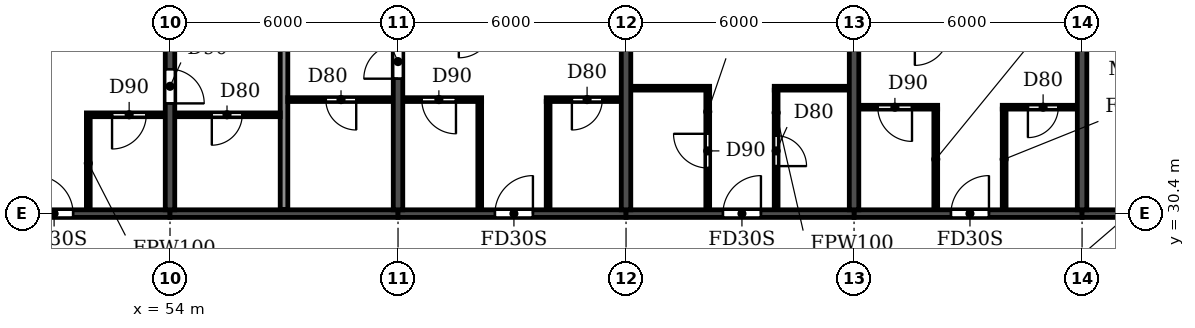
"""IFC4 building model, lengths in metres.
Left out: names, types, materials, properties, quantities, classifications, styles, units other than length and angle.
Written with IfcOpenShell. Run it as: python <this file> out.ifc"""

import sys

from ifc_helpers import new_model, si_unit, direction, frame, frame_2d, origin, place, context, subcontext, project, spatial, rectangle, extrude, element, fill, save


model = new_model("IFC4")
c1 = context("Model", 3, precision=1e-05, world=origin(), true_north=direction((0.0, 1.0)))
c2 = subcontext(c1, "Body", "Model", "MODEL_VIEW")
j1 = project(units=[si_unit("LENGTHUNIT", "METRE"), si_unit("PLANEANGLEUNIT", "RADIAN")], contexts=[c1])
p1 = place(None, origin())
s1 = spatial("IfcSite", under=j1, at=p1, CompositionType="ELEMENT")
p2 = place(p1, origin())
s2 = spatial("IfcBuilding", under=s1, at=p2, CompositionType="ELEMENT")
p3 = place(p2, frame((0.0, 0.0, 231.3)))
s3 = spatial("IfcBuildingStorey", under=s2, at=p3, CompositionType="ELEMENT", Elevation=231.3)
p4 = place(p3, frame((54.0, 30.5, 0.0), z_axis=(0.0, 0.0, 1.0), x_axis=(0.0, 1.0, 0.0)))
e1 = element("IfcWall", 1, at=p4, inside=s3, PredefinedType="SHEAR", context=c2, shape_type="SweptSolid", body=[
    extrude(rectangle(XDim=10.5, YDim=0.25, at=frame_2d((5.25, 0.0))), origin(), (0.0, 0.0, 1.0), 3.08),
])
p5 = place(p4, frame((2.8, 0.0, 0.0)))
e2 = element("IfcOpeningElement", 2, at=p5, cuts=e1, PredefinedType="OPENING", context=c2, shape_type="SweptSolid", body=[
    extrude(rectangle(XDim=0.9, YDim=2.1, at=frame_2d((0.45, 1.05))), frame((0.0, 0.135, 0.0), z_axis=(0.0, -1.0, 0.0), x_axis=(1.0, 0.0, 0.0)), (0.0, 0.0, 1.0), 0.27),
])
p6 = place(p3, frame((60.0, 30.5, 0.0), z_axis=(0.0, 0.0, 1.0), x_axis=(0.0, 1.0, 0.0)))
e3 = element("IfcWall", 3, at=p6, inside=s3, PredefinedType="SHEAR", context=c2, shape_type="SweptSolid", body=[
    extrude(rectangle(XDim=10.5, YDim=0.25, at=frame_2d((5.25, 0.0))), origin(), (0.0, 0.0, 1.0), 3.08),
])
p7 = place(p6, frame((3.45, 0.0, 0.0)))
e4 = element("IfcOpeningElement", 4, at=p7, cuts=e3, PredefinedType="OPENING", context=c2, shape_type="SweptSolid", body=[
    extrude(rectangle(XDim=0.9, YDim=2.1, at=frame_2d((0.45, 1.05))), frame((0.0, 0.135, 0.0), z_axis=(0.0, -1.0, 0.0), x_axis=(1.0, 0.0, 0.0)), (0.0, 0.0, 1.0), 0.27),
])
for number, where, z_axis, x_axis in (
    (5, (66.0, 30.5, 0.0), (0.0, 0.0, 1.0), (0.0, 1.0, 0.0)),
    (6, (72.0, 30.5, 0.0), (0.0, 0.0, 1.0), (0.0, 1.0, 0.0)),
    (7, (78.0, 30.5, 0.0), (0.0, 0.0, 1.0), (0.0, 1.0, 0.0)),
):
    element("IfcWall", number, at=place(p3, frame(where, z_axis=z_axis, x_axis=x_axis)), inside=s3, PredefinedType="SHEAR", context=c2, shape_type="SweptSolid", body=[
        extrude(rectangle(XDim=10.5, YDim=0.25, at=frame_2d((5.25, 0.0))), origin(), (0.0, 0.0, 1.0), 3.08),
    ])
p8 = place(p3, frame((48.0, 30.4, 0.0), z_axis=(0.0, 0.0, 1.0), x_axis=(1.0, 0.0, 0.0)))
e8 = element("IfcWall", 8, at=p8, inside=s3, PredefinedType="SHEAR", context=c2, shape_type="SweptSolid", body=[
    extrude(rectangle(XDim=6.0, YDim=0.2, at=frame_2d((3.0, 0.0))), origin(), (0.0, 0.0, 1.0), 2.48),
])
p9 = place(p8, frame((2.45, 0.0, 0.0)))
e9 = element("IfcOpeningElement", 9, at=p9, cuts=e8, PredefinedType="OPENING", context=c2, shape_type="SweptSolid", body=[
    extrude(rectangle(XDim=1.0, YDim=2.1, at=frame_2d((0.5, 1.05))), frame((0.0, 0.11, 0.0), z_axis=(0.0, -1.0, 0.0), x_axis=(1.0, 0.0, 0.0)), (0.0, 0.0, 1.0), 0.22),
])
p10 = place(p3, frame((54.0, 30.4, 0.0), z_axis=(0.0, 0.0, 1.0), x_axis=(1.0, 0.0, 0.0)))
e10 = element("IfcWall", 10, at=p10, inside=s3, PredefinedType="SHEAR", context=c2, shape_type="SweptSolid", body=[
    extrude(rectangle(XDim=6.0, YDim=0.2, at=frame_2d((3.0, 0.0))), origin(), (0.0, 0.0, 1.0), 2.48),
])
p11 = place(p3, frame((60.0, 30.4, 0.0), z_axis=(0.0, 0.0, 1.0), x_axis=(1.0, 0.0, 0.0)))
e11 = element("IfcWall", 11, at=p11, inside=s3, PredefinedType="SHEAR", context=c2, shape_type="SweptSolid", body=[
    extrude(rectangle(XDim=6.0, YDim=0.2, at=frame_2d((3.0, 0.0))), origin(), (0.0, 0.0, 1.0), 2.48),
])
p12 = place(p11, frame((2.55, 0.0, 0.0)))
e12 = element("IfcOpeningElement", 12, at=p12, cuts=e11, PredefinedType="OPENING", context=c2, shape_type="SweptSolid", body=[
    extrude(rectangle(XDim=1.0, YDim=2.1, at=frame_2d((0.5, 1.05))), frame((0.0, 0.11, 0.0), z_axis=(0.0, -1.0, 0.0), x_axis=(1.0, 0.0, 0.0)), (0.0, 0.0, 1.0), 0.22),
])
p13 = place(p3, frame((66.0, 30.4, 0.0), z_axis=(0.0, 0.0, 1.0), x_axis=(1.0, 0.0, 0.0)))
e13 = element("IfcWall", 13, at=p13, inside=s3, PredefinedType="SHEAR", context=c2, shape_type="SweptSolid", body=[
    extrude(rectangle(XDim=6.0, YDim=0.2, at=frame_2d((3.0, 0.0))), origin(), (0.0, 0.0, 1.0), 2.48),
])
p14 = place(p13, frame((2.55, 0.0, 0.0)))
e14 = element("IfcOpeningElement", 14, at=p14, cuts=e13, PredefinedType="OPENING", context=c2, shape_type="SweptSolid", body=[
    extrude(rectangle(XDim=1.0, YDim=2.1, at=frame_2d((0.5, 1.05))), frame((0.0, 0.11, 0.0), z_axis=(0.0, -1.0, 0.0), x_axis=(1.0, 0.0, 0.0)), (0.0, 0.0, 1.0), 0.22),
])
p15 = place(p3, frame((72.0, 30.4, 0.0), z_axis=(0.0, 0.0, 1.0), x_axis=(1.0, 0.0, 0.0)))
e15 = element("IfcWall", 15, at=p15, inside=s3, PredefinedType="SHEAR", context=c2, shape_type="SweptSolid", body=[
    extrude(rectangle(XDim=6.0, YDim=0.2, at=frame_2d((3.0, 0.0))), origin(), (0.0, 0.0, 1.0), 2.48),
])
p16 = place(p15, frame((2.55, 0.0, 0.0)))
e16 = element("IfcOpeningElement", 16, at=p16, cuts=e15, PredefinedType="OPENING", context=c2, shape_type="SweptSolid", body=[
    extrude(rectangle(XDim=1.0, YDim=2.1, at=frame_2d((0.5, 1.05))), frame((0.0, 0.11, 0.0), z_axis=(0.0, -1.0, 0.0), x_axis=(1.0, 0.0, 0.0)), (0.0, 0.0, 1.0), 0.22),
])
p17 = place(p3, frame((78.0, 30.4, 0.0), z_axis=(0.0, 0.0, 1.0), x_axis=(1.0, 0.0, 0.0)))
e17 = element("IfcWall", 17, at=p17, inside=s3, PredefinedType="SHEAR", context=c2, shape_type="SweptSolid", body=[
    extrude(rectangle(XDim=5.8, YDim=0.2, at=frame_2d((2.9, 0.0))), origin(), (0.0, 0.0, 1.0), 2.48),
])
p18 = place(p17, frame((2.5, 0.0, 0.0)))
e18 = element("IfcOpeningElement", 18, at=p18, cuts=e17, PredefinedType="OPENING", context=c2, shape_type="SweptSolid", body=[
    extrude(rectangle(XDim=1.0, YDim=2.1, at=frame_2d((0.5, 1.05))), frame((0.0, 0.11, 0.0), z_axis=(0.0, -1.0, 0.0), x_axis=(1.0, 0.0, 0.0)), (0.0, 0.0, 1.0), 0.22),
])
p19 = place(p3, frame((57.0, 30.51, 0.0), z_axis=(0.0, 0.0, 1.0), x_axis=(0.0, 1.0, 0.0)))
e19 = element("IfcWall", 19, at=p19, inside=s3, PredefinedType="PARTITIONING", context=c2, shape_type="SweptSolid", body=[
    extrude(rectangle(XDim=10.63, YDim=0.2, at=frame_2d((5.315, 0.0))), origin(), (0.0, 0.0, 1.0), 3.08),
])
p20 = place(p3, frame((51.8, 33.0, 0.0), z_axis=(0.0, 0.0, 1.0), x_axis=(1.0, 0.0, 0.0)))
e20 = element("IfcWall", 20, at=p20, inside=s3, PredefinedType="PARTITIONING", context=c2, shape_type="SweptSolid", body=[
    extrude(rectangle(XDim=2.065, YDim=0.1, at=frame_2d((1.032, 0.0))), origin(), (0.0, 0.0, 1.0), 3.08),
])
p21 = place(p20, frame((0.675, 0.0, 0.0)))
e21 = element("IfcOpeningElement", 21, at=p21, cuts=e20, PredefinedType="OPENING", context=c2, shape_type="SweptSolid", body=[
    extrude(rectangle(XDim=0.9, YDim=2.1, at=frame_2d((0.45, 1.05))), frame((0.0, 0.06, 0.0), z_axis=(0.0, -1.0, 0.0), x_axis=(1.0, 0.0, 0.0)), (0.0, 0.0, 1.0), 0.12),
])
p22 = place(p3, frame((54.135, 33.0, 0.0), z_axis=(0.0, 0.0, 1.0), x_axis=(1.0, 0.0, 0.0)))
e22 = element("IfcWall", 22, at=p22, inside=s3, PredefinedType="PARTITIONING", context=c2, shape_type="SweptSolid", body=[
    extrude(rectangle(XDim=2.765, YDim=0.1, at=frame_2d((1.382, 0.0))), origin(), (0.0, 0.0, 1.0), 3.08),
])
p23 = place(p22, frame((0.965, 0.0, 0.0)))
e23 = element("IfcOpeningElement", 23, at=p23, cuts=e22, PredefinedType="OPENING", context=c2, shape_type="SweptSolid", body=[
    extrude(rectangle(XDim=0.8, YDim=2.1, at=frame_2d((0.4, 1.05))), frame((0.0, 0.06, 0.0), z_axis=(0.0, -1.0, 0.0), x_axis=(1.0, 0.0, 0.0)), (0.0, 0.0, 1.0), 0.12),
])
p24 = place(p3, frame((72.135, 33.2, 0.0), z_axis=(0.0, 0.0, 1.0), x_axis=(1.0, 0.0, 0.0)))
e24 = element("IfcWall", 24, at=p24, inside=s3, PredefinedType="PARTITIONING", context=c2, shape_type="SweptSolid", body=[
    extrude(rectangle(XDim=2.065, YDim=0.1, at=frame_2d((1.032, 0.0))), origin(), (0.0, 0.0, 1.0), 3.08),
])
p25 = place(p24, frame((0.49, 0.0, 0.0)))
e25 = element("IfcOpeningElement", 25, at=p25, cuts=e24, PredefinedType="OPENING", context=c2, shape_type="SweptSolid", body=[
    extrude(rectangle(XDim=0.9, YDim=2.1, at=frame_2d((0.45, 1.05))), frame((0.0, 0.06, 0.0), z_axis=(0.0, -1.0, 0.0), x_axis=(1.0, 0.0, 0.0)), (0.0, 0.0, 1.0), 0.12),
])
p26 = place(p3, frame((75.9, 33.2, 0.0), z_axis=(0.0, 0.0, 1.0), x_axis=(1.0, 0.0, 0.0)))
e26 = element("IfcWall", 26, at=p26, inside=s3, PredefinedType="PARTITIONING", context=c2, shape_type="SweptSolid", body=[
    extrude(rectangle(XDim=1.965, YDim=0.1, at=frame_2d((0.982, 0.0))), origin(), (0.0, 0.0, 1.0), 3.08),
])
p27 = place(p26, frame((0.675, 0.0, 0.0)))
e27 = element("IfcOpeningElement", 27, at=p27, cuts=e26, PredefinedType="OPENING", context=c2, shape_type="SweptSolid", body=[
    extrude(rectangle(XDim=0.8, YDim=2.1, at=frame_2d((0.4, 1.05))), frame((0.0, 0.06, 0.0), z_axis=(0.0, -1.0, 0.0), x_axis=(1.0, 0.0, 0.0)), (0.0, 0.0, 1.0), 0.12),
])
p28 = place(p3, frame((57.1, 33.4, 0.0), z_axis=(0.0, 0.0, 1.0), x_axis=(1.0, 0.0, 0.0)))
e28 = element("IfcWall", 28, at=p28, inside=s3, PredefinedType="PARTITIONING", context=c2, shape_type="SweptSolid", body=[
    extrude(rectangle(XDim=2.765, YDim=0.1, at=frame_2d((1.382, 0.0))), origin(), (0.0, 0.0, 1.0), 3.08),
])
p29 = place(p28, frame((1.0, 0.0, 0.0)))
e29 = element("IfcOpeningElement", 29, at=p29, cuts=e28, PredefinedType="OPENING", context=c2, shape_type="SweptSolid", body=[
    extrude(rectangle(XDim=0.8, YDim=2.1, at=frame_2d((0.4, 1.05))), frame((0.0, 0.06, 0.0), z_axis=(0.0, -1.0, 0.0), x_axis=(1.0, 0.0, 0.0)), (0.0, 0.0, 1.0), 0.12),
])
p30 = place(p3, frame((60.135, 33.4, 0.0), z_axis=(0.0, 0.0, 1.0), x_axis=(1.0, 0.0, 0.0)))
e30 = element("IfcWall", 30, at=p30, inside=s3, PredefinedType="PARTITIONING", context=c2, shape_type="SweptSolid", body=[
    extrude(rectangle(XDim=2.065, YDim=0.1, at=frame_2d((1.032, 0.0))), origin(), (0.0, 0.0, 1.0), 3.08),
])
p31 = place(p30, frame((0.49, 0.0, 0.0)))
e31 = element("IfcOpeningElement", 31, at=p31, cuts=e30, PredefinedType="OPENING", context=c2, shape_type="SweptSolid", body=[
    extrude(rectangle(XDim=0.9, YDim=2.1, at=frame_2d((0.45, 1.05))), frame((0.0, 0.06, 0.0), z_axis=(0.0, -1.0, 0.0), x_axis=(1.0, 0.0, 0.0)), (0.0, 0.0, 1.0), 0.12),
])
p32 = place(p3, frame((63.9, 33.4, 0.0), z_axis=(0.0, 0.0, 1.0), x_axis=(1.0, 0.0, 0.0)))
e32 = element("IfcWall", 32, at=p32, inside=s3, PredefinedType="PARTITIONING", context=c2, shape_type="SweptSolid", body=[
    extrude(rectangle(XDim=1.965, YDim=0.1, at=frame_2d((0.982, 0.0))), origin(), (0.0, 0.0, 1.0), 3.08),
])
p33 = place(p32, frame((0.675, 0.0, 0.0)))
e33 = element("IfcOpeningElement", 33, at=p33, cuts=e32, PredefinedType="OPENING", context=c2, shape_type="SweptSolid", body=[
    extrude(rectangle(XDim=0.8, YDim=2.1, at=frame_2d((0.4, 1.05))), frame((0.0, 0.06, 0.0), z_axis=(0.0, -1.0, 0.0), x_axis=(1.0, 0.0, 0.0)), (0.0, 0.0, 1.0), 0.12),
])
p34 = place(p3, frame((66.135, 33.7, 0.0), z_axis=(0.0, 0.0, 1.0), x_axis=(1.0, 0.0, 0.0)))
e34 = element("IfcWall", 34, at=p34, inside=s3, PredefinedType="PARTITIONING", context=c2, shape_type="SweptSolid", body=[
    extrude(rectangle(XDim=2.065, YDim=0.1, at=frame_2d((1.032, 0.0))), origin(), (0.0, 0.0, 1.0), 3.08),
])
p35 = place(p3, frame((69.9, 33.7, 0.0), z_axis=(0.0, 0.0, 1.0), x_axis=(1.0, 0.0, 0.0)))
e35 = element("IfcWall", 35, at=p35, inside=s3, PredefinedType="PARTITIONING", context=c2, shape_type="SweptSolid", body=[
    extrude(rectangle(XDim=1.965, YDim=0.1, at=frame_2d((0.982, 0.0))), origin(), (0.0, 0.0, 1.0), 3.08),
])
p36 = place(p3, frame((51.85, 30.51, 0.0), z_axis=(0.0, 0.0, 1.0), x_axis=(0.0, 1.0, 0.0)))
e36 = element("IfcWall", 36, at=p36, inside=s3, PredefinedType="PARTITIONING", context=c2, shape_type="SweptSolid", body=[
    extrude(rectangle(XDim=2.44, YDim=0.1, at=frame_2d((1.22, 0.0))), origin(), (0.0, 0.0, 1.0), 3.08),
])
for number, where, z_axis, x_axis in (
    (37, (62.15, 30.51, 0.0), (0.0, 0.0, 1.0), (0.0, 1.0, 0.0)),
    (38, (63.95, 30.51, 0.0), (0.0, 0.0, 1.0), (0.0, 1.0, 0.0)),
):
    element("IfcWall", number, at=place(p3, frame(where, z_axis=z_axis, x_axis=x_axis)), inside=s3, PredefinedType="PARTITIONING", context=c2, shape_type="SweptSolid", body=[
        extrude(rectangle(XDim=2.84, YDim=0.1, at=frame_2d((1.42, 0.0))), origin(), (0.0, 0.0, 1.0), 3.08),
    ])
p37 = place(p3, frame((68.15, 30.51, 0.0), z_axis=(0.0, 0.0, 1.0), x_axis=(0.0, 1.0, 0.0)))
e39 = element("IfcWall", 39, at=p37, inside=s3, PredefinedType="PARTITIONING", context=c2, shape_type="SweptSolid", body=[
    extrude(rectangle(XDim=3.14, YDim=0.1, at=frame_2d((1.57, 0.0))), origin(), (0.0, 0.0, 1.0), 3.08),
])
p38 = place(p37, frame((1.09, 0.0, 0.0)))
e40 = element("IfcOpeningElement", 40, at=p38, cuts=e39, PredefinedType="OPENING", context=c2, shape_type="SweptSolid", body=[
    extrude(rectangle(XDim=0.9, YDim=2.1, at=frame_2d((0.45, 1.05))), frame((0.0, 0.06, 0.0), z_axis=(0.0, -1.0, 0.0), x_axis=(1.0, 0.0, 0.0)), (0.0, 0.0, 1.0), 0.12),
])
p39 = place(p3, frame((69.95, 30.51, 0.0), z_axis=(0.0, 0.0, 1.0), x_axis=(0.0, 1.0, 0.0)))
e41 = element("IfcWall", 41, at=p39, inside=s3, PredefinedType="PARTITIONING", context=c2, shape_type="SweptSolid", body=[
    extrude(rectangle(XDim=3.14, YDim=0.1, at=frame_2d((1.57, 0.0))), origin(), (0.0, 0.0, 1.0), 3.08),
])
p40 = place(p39, frame((1.14, 0.0, 0.0)))
e42 = element("IfcOpeningElement", 42, at=p40, cuts=e41, PredefinedType="OPENING", context=c2, shape_type="SweptSolid", body=[
    extrude(rectangle(XDim=0.8, YDim=2.1, at=frame_2d((0.4, 1.05))), frame((0.0, 0.06, 0.0), z_axis=(0.0, -1.0, 0.0), x_axis=(1.0, 0.0, 0.0)), (0.0, 0.0, 1.0), 0.12),
])
for number, where, z_axis, x_axis in (
    (43, (74.15, 30.51, 0.0), (0.0, 0.0, 1.0), (0.0, 1.0, 0.0)),
    (44, (75.95, 30.51, 0.0), (0.0, 0.0, 1.0), (0.0, 1.0, 0.0)),
):
    element("IfcWall", number, at=place(p3, frame(where, z_axis=z_axis, x_axis=x_axis)), inside=s3, PredefinedType="PARTITIONING", context=c2, shape_type="SweptSolid", body=[
        extrude(rectangle(XDim=2.64, YDim=0.1, at=frame_2d((1.32, 0.0))), origin(), (0.0, 0.0, 1.0), 3.08),
    ])
p41 = place(p23, frame((0.8, 0.0, 0.0), z_axis=(0.0, 0.0, 1.0), x_axis=(-1.0, 0.0, 0.0)))
e45 = element("IfcDoor", 45, at=p41, inside=s3, OperationType="SINGLE_SWING_RIGHT", PredefinedType="DOOR", context=c2, shape_type="SweptSolid", body=[
    extrude(rectangle(XDim=0.8, YDim=2.1, at=frame_2d((0.4, 1.05))), frame((0.0, 0.025, 0.0), z_axis=(0.0, -1.0, 0.0), x_axis=(1.0, 0.0, 0.0)), (0.0, 0.0, 1.0), 0.05),
])
fill(e23, e45)
p42 = place(p9, origin())
e46 = element("IfcDoor", 46, at=p42, inside=s3, OperationType="SINGLE_SWING_LEFT", PredefinedType="DOOR", context=c2, shape_type="SweptSolid", body=[
    extrude(rectangle(XDim=1.0, YDim=2.1, at=frame_2d((0.5, 1.05))), frame((0.0, 0.025, 0.0), z_axis=(0.0, -1.0, 0.0), x_axis=(1.0, 0.0, 0.0)), (0.0, 0.0, 1.0), 0.05),
])
fill(e9, e46)
p43 = place(p21, frame((0.9, 0.0, 0.0), z_axis=(0.0, 0.0, 1.0), x_axis=(-1.0, 0.0, 0.0)))
e47 = element("IfcDoor", 47, at=p43, inside=s3, OperationType="SINGLE_SWING_RIGHT", PredefinedType="DOOR", context=c2, shape_type="SweptSolid", body=[
    extrude(rectangle(XDim=0.9, YDim=2.1, at=frame_2d((0.45, 1.05))), frame((0.0, 0.025, 0.0), z_axis=(0.0, -1.0, 0.0), x_axis=(1.0, 0.0, 0.0)), (0.0, 0.0, 1.0), 0.05),
])
fill(e21, e47)
p44 = place(p5, frame((0.9, 0.0, 0.0), z_axis=(0.0, 0.0, 1.0), x_axis=(-1.0, 0.0, 0.0)))
e48 = element("IfcDoor", 48, at=p44, inside=s3, OperationType="SINGLE_SWING_RIGHT", PredefinedType="DOOR", context=c2, shape_type="SweptSolid", body=[
    extrude(rectangle(XDim=0.9, YDim=2.1, at=frame_2d((0.45, 1.05))), frame((0.0, 0.025, 0.0), z_axis=(0.0, -1.0, 0.0), x_axis=(1.0, 0.0, 0.0)), (0.0, 0.0, 1.0), 0.05),
])
fill(e2, e48)
p45 = place(p29, frame((0.8, 0.0, 0.0), z_axis=(0.0, 0.0, 1.0), x_axis=(-1.0, 0.0, 0.0)))
e49 = element("IfcDoor", 49, at=p45, inside=s3, OperationType="SINGLE_SWING_LEFT", PredefinedType="DOOR", context=c2, shape_type="SweptSolid", body=[
    extrude(rectangle(XDim=0.8, YDim=2.1, at=frame_2d((0.4, 1.05))), frame((0.0, 0.025, 0.0), z_axis=(0.0, -1.0, 0.0), x_axis=(1.0, 0.0, 0.0)), (0.0, 0.0, 1.0), 0.05),
])
fill(e29, e49)
p46 = place(p7, origin())
e50 = element("IfcDoor", 50, at=p46, inside=s3, OperationType="SINGLE_SWING_LEFT", PredefinedType="DOOR", context=c2, shape_type="SweptSolid", body=[
    extrude(rectangle(XDim=0.9, YDim=2.1, at=frame_2d((0.45, 1.05))), frame((0.0, 0.025, 0.0), z_axis=(0.0, -1.0, 0.0), x_axis=(1.0, 0.0, 0.0)), (0.0, 0.0, 1.0), 0.05),
])
fill(e4, e50)
p47 = place(p31, frame((0.9, 0.0, 0.0), z_axis=(0.0, 0.0, 1.0), x_axis=(-1.0, 0.0, 0.0)))
e51 = element("IfcDoor", 51, at=p47, inside=s3, OperationType="SINGLE_SWING_LEFT", PredefinedType="DOOR", context=c2, shape_type="SweptSolid", body=[
    extrude(rectangle(XDim=0.9, YDim=2.1, at=frame_2d((0.45, 1.05))), frame((0.0, 0.025, 0.0), z_axis=(0.0, -1.0, 0.0), x_axis=(1.0, 0.0, 0.0)), (0.0, 0.0, 1.0), 0.05),
])
fill(e31, e51)
p48 = place(p12, origin())
e52 = element("IfcDoor", 52, at=p48, inside=s3, OperationType="SINGLE_SWING_RIGHT", PredefinedType="DOOR", context=c2, shape_type="SweptSolid", body=[
    extrude(rectangle(XDim=1.0, YDim=2.1, at=frame_2d((0.5, 1.05))), frame((0.0, 0.025, 0.0), z_axis=(0.0, -1.0, 0.0), x_axis=(1.0, 0.0, 0.0)), (0.0, 0.0, 1.0), 0.05),
])
fill(e12, e52)
p49 = place(p33, frame((0.8, 0.0, 0.0), z_axis=(0.0, 0.0, 1.0), x_axis=(-1.0, 0.0, 0.0)))
e53 = element("IfcDoor", 53, at=p49, inside=s3, OperationType="SINGLE_SWING_RIGHT", PredefinedType="DOOR", context=c2, shape_type="SweptSolid", body=[
    extrude(rectangle(XDim=0.8, YDim=2.1, at=frame_2d((0.4, 1.05))), frame((0.0, 0.025, 0.0), z_axis=(0.0, -1.0, 0.0), x_axis=(1.0, 0.0, 0.0)), (0.0, 0.0, 1.0), 0.05),
])
fill(e33, e53)
p50 = place(p38, origin())
e54 = element("IfcDoor", 54, at=p50, inside=s3, OperationType="SINGLE_SWING_RIGHT", PredefinedType="DOOR", context=c2, shape_type="SweptSolid", body=[
    extrude(rectangle(XDim=0.9, YDim=2.1, at=frame_2d((0.45, 1.05))), frame((0.0, 0.025, 0.0), z_axis=(0.0, -1.0, 0.0), x_axis=(1.0, 0.0, 0.0)), (0.0, 0.0, 1.0), 0.05),
])
fill(e40, e54)
p51 = place(p14, origin())
e55 = element("IfcDoor", 55, at=p51, inside=s3, OperationType="SINGLE_SWING_RIGHT", PredefinedType="DOOR", context=c2, shape_type="SweptSolid", body=[
    extrude(rectangle(XDim=1.0, YDim=2.1, at=frame_2d((0.5, 1.05))), frame((0.0, 0.025, 0.0), z_axis=(0.0, -1.0, 0.0), x_axis=(1.0, 0.0, 0.0)), (0.0, 0.0, 1.0), 0.05),
])
fill(e14, e55)
p52 = place(p40, frame((0.8, 0.0, 0.0), z_axis=(0.0, 0.0, 1.0), x_axis=(-1.0, 0.0, 0.0)))
e56 = element("IfcDoor", 56, at=p52, inside=s3, OperationType="SINGLE_SWING_RIGHT", PredefinedType="DOOR", context=c2, shape_type="SweptSolid", body=[
    extrude(rectangle(XDim=0.8, YDim=2.1, at=frame_2d((0.4, 1.05))), frame((0.0, 0.025, 0.0), z_axis=(0.0, -1.0, 0.0), x_axis=(1.0, 0.0, 0.0)), (0.0, 0.0, 1.0), 0.05),
])
fill(e42, e56)
p53 = place(p25, frame((0.9, 0.0, 0.0), z_axis=(0.0, 0.0, 1.0), x_axis=(-1.0, 0.0, 0.0)))
e57 = element("IfcDoor", 57, at=p53, inside=s3, OperationType="SINGLE_SWING_LEFT", PredefinedType="DOOR", context=c2, shape_type="SweptSolid", body=[
    extrude(rectangle(XDim=0.9, YDim=2.1, at=frame_2d((0.45, 1.05))), frame((0.0, 0.025, 0.0), z_axis=(0.0, -1.0, 0.0), x_axis=(1.0, 0.0, 0.0)), (0.0, 0.0, 1.0), 0.05),
])
fill(e25, e57)
p54 = place(p16, origin())
e58 = element("IfcDoor", 58, at=p54, inside=s3, OperationType="SINGLE_SWING_RIGHT", PredefinedType="DOOR", context=c2, shape_type="SweptSolid", body=[
    extrude(rectangle(XDim=1.0, YDim=2.1, at=frame_2d((0.5, 1.05))), frame((0.0, 0.025, 0.0), z_axis=(0.0, -1.0, 0.0), x_axis=(1.0, 0.0, 0.0)), (0.0, 0.0, 1.0), 0.05),
])
fill(e16, e58)
p55 = place(p27, frame((0.8, 0.0, 0.0), z_axis=(0.0, 0.0, 1.0), x_axis=(-1.0, 0.0, 0.0)))
e59 = element("IfcDoor", 59, at=p55, inside=s3, OperationType="SINGLE_SWING_RIGHT", PredefinedType="DOOR", context=c2, shape_type="SweptSolid", body=[
    extrude(rectangle(XDim=0.8, YDim=2.1, at=frame_2d((0.4, 1.05))), frame((0.0, 0.025, 0.0), z_axis=(0.0, -1.0, 0.0), x_axis=(1.0, 0.0, 0.0)), (0.0, 0.0, 1.0), 0.05),
])
fill(e27, e59)
save(model, sys.argv[1])
